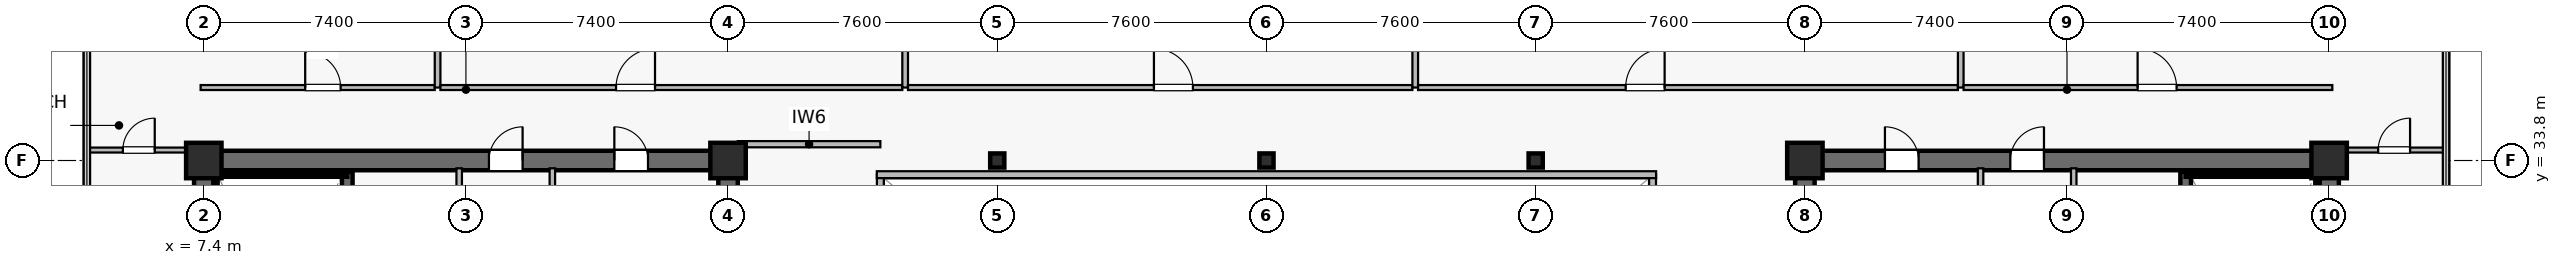
"""IFC4 building model, lengths in metres.
Left out: names, types, materials, properties, quantities, classifications, styles, units other than length and angle.
Written with IfcOpenShell. Run it as: python <this file> out.ifc"""

import sys

from ifc_helpers import new_model, si_unit, direction, frame, frame_2d, origin, origin_2d, place, context, subcontext, project, spatial, rectangle, hollow_rectangle, extrude, source, transform, mapped, element, fill, save


model = new_model("IFC4")
c1 = context("Model", 3, precision=1e-05, world=origin(), true_north=direction((0.0, 1.0)))
c2 = subcontext(c1, "Body", "Model", "MODEL_VIEW")
j1 = project(units=[si_unit("LENGTHUNIT", "METRE"), si_unit("PLANEANGLEUNIT", "RADIAN")], contexts=[c1])
p1 = place(None, origin())
s1 = spatial("IfcSite", under=j1, at=p1, CompositionType="ELEMENT")
p2 = place(p1, origin())
s2 = spatial("IfcBuilding", under=s1, at=p2, CompositionType="ELEMENT")
p3 = place(p2, frame((0.0, 0.0, 213.7)))
s3 = spatial("IfcBuildingStorey", under=s2, at=p3, CompositionType="ELEMENT", Elevation=213.7)
p4 = place(p3, frame((7.125, 33.8, 0.0), z_axis=(0.0, 0.0, 1.0), x_axis=(1.0, 0.0, 0.0)))
e1 = element("IfcWall", 1, at=p4, inside=s3, PredefinedType="SHEAR", context=c2, shape_type="SweptSolid", body=[
    extrude(rectangle(XDim=15.35, YDim=0.55, at=frame_2d((7.675, 0.0))), origin(), (0.0, 0.0, 1.0), 3.8),
])
p5 = place(p4, frame((8.325, 0.0, 0.0)))
e2 = element("IfcOpeningElement", 2, at=p5, cuts=e1, PredefinedType="OPENING", context=c2, shape_type="SweptSolid", body=[
    extrude(rectangle(XDim=0.95, YDim=2.15, at=frame_2d((0.475, 1.075))), frame((0.0, 0.285, 0.0), z_axis=(0.0, -1.0, 0.0), x_axis=(1.0, 0.0, 0.0)), (0.0, 0.0, 1.0), 0.57),
])
p6 = place(p4, frame((11.865, 0.0, 0.0)))
e3 = element("IfcOpeningElement", 3, at=p6, cuts=e1, PredefinedType="OPENING", context=c2, shape_type="SweptSolid", body=[
    extrude(rectangle(XDim=0.95, YDim=2.15, at=frame_2d((0.475, 1.075))), frame((0.0, 0.285, 0.0), z_axis=(0.0, -1.0, 0.0), x_axis=(1.0, 0.0, 0.0)), (0.0, 0.0, 1.0), 0.57),
])
p7 = place(p3, frame((7.4, 15.075, 0.0), z_axis=(0.0, 0.0, 1.0), x_axis=(0.0, 1.0, 0.0)))
e4 = element("IfcWall", 4, at=p7, inside=s3, PredefinedType="SHEAR", context=c2, shape_type="SweptSolid", body=[
    extrude(rectangle(XDim=18.45, YDim=0.55, at=frame_2d((9.225, 0.0))), origin(), (0.0, 0.0, 1.0), 3.8),
])
p8 = place(p3, frame((22.2, 15.075, 0.0), z_axis=(0.0, 0.0, 1.0), x_axis=(0.0, 1.0, 0.0)))
e5 = element("IfcWall", 5, at=p8, inside=s3, PredefinedType="SHEAR", context=c2, shape_type="SweptSolid", body=[
    extrude(rectangle(XDim=18.45, YDim=0.55, at=frame_2d((9.225, 0.0))), origin(), (0.0, 0.0, 1.0), 3.8),
])
p9 = place(p8, frame((3.475, 0.0, 0.0)))
e6 = element("IfcOpeningElement", 6, at=p9, cuts=e5, PredefinedType="OPENING", context=c2, shape_type="SweptSolid", body=[
    extrude(rectangle(XDim=1.42, YDim=2.2, at=frame_2d((0.71, 1.1))), frame((0.0, 0.285, 0.0), z_axis=(0.0, -1.0, 0.0), x_axis=(1.0, 0.0, 0.0)), (0.0, 0.0, 1.0), 0.57),
])
p10 = place(p3, frame((11.45, 24.85, 0.0), z_axis=(0.0, 0.0, 1.0), x_axis=(0.0, 1.0, 0.0)))
e7 = element("IfcWall", 7, at=p10, inside=s3, PredefinedType="SHEAR", context=c2, shape_type="SweptSolid", body=[
    extrude(rectangle(XDim=8.63, YDim=0.3, at=frame_2d((4.315, 0.0))), origin(), (0.0, 0.0, 1.0), 3.8),
])
p11 = place(p10, frame((0.42, 0.0, 0.0)))
e8 = element("IfcOpeningElement", 8, at=p11, cuts=e7, PredefinedType="OPENING", context=c2, shape_type="SweptSolid", body=[
    extrude(rectangle(XDim=1.1, YDim=2.15, at=frame_2d((0.55, 1.075))), frame((0.0, 0.16, 0.0), z_axis=(0.0, -1.0, 0.0), x_axis=(1.0, 0.0, 0.0)), (0.0, 0.0, 1.0), 0.32),
])
p12 = place(p3, frame((7.73, 33.4, 0.0), z_axis=(0.0, 0.0, 1.0), x_axis=(1.0, 0.0, 0.0)))
e9 = element("IfcWall", 9, at=p12, inside=s3, PredefinedType="SOLIDWALL", context=c2, shape_type="SweptSolid", body=[
    extrude(rectangle(XDim=3.72, YDim=0.12, at=frame_2d((1.86, 0.0))), origin(), (0.0, 0.0, 1.0), 3.8),
])
p13 = place(p3, frame((7.73, 25.0, 0.0), z_axis=(0.0, 0.0, 1.0), x_axis=(0.0, 1.0, 0.0)))
e10 = element("IfcWall", 10, at=p13, inside=s3, PredefinedType="SOLIDWALL", context=c2, shape_type="SweptSolid", body=[
    extrude(rectangle(XDim=8.32, YDim=0.12, at=frame_2d((4.16, 0.0))), origin(), (0.0, 0.0, 1.0), 3.8),
])
p14 = place(p3, frame((52.325, 33.8, 0.0), z_axis=(0.0, 0.0, 1.0), x_axis=(1.0, 0.0, 0.0)))
e11 = element("IfcWall", 11, at=p14, inside=s3, PredefinedType="SHEAR", context=c2, shape_type="SweptSolid", body=[
    extrude(rectangle(XDim=15.35, YDim=0.55, at=frame_2d((7.675, 0.0))), origin(), (0.0, 0.0, 1.0), 3.8),
])
p15 = place(p14, frame((6.075, 0.0, 0.0)))
e12 = element("IfcOpeningElement", 12, at=p15, cuts=e11, PredefinedType="OPENING", context=c2, shape_type="SweptSolid", body=[
    extrude(rectangle(XDim=0.95, YDim=2.15, at=frame_2d((0.475, 1.075))), frame((0.0, 0.285, 0.0), z_axis=(0.0, -1.0, 0.0), x_axis=(1.0, 0.0, 0.0)), (0.0, 0.0, 1.0), 0.57),
])
p16 = place(p14, frame((2.535, 0.0, 0.0)))
e13 = element("IfcOpeningElement", 13, at=p16, cuts=e11, PredefinedType="OPENING", context=c2, shape_type="SweptSolid", body=[
    extrude(rectangle(XDim=0.95, YDim=2.15, at=frame_2d((0.475, 1.075))), frame((0.0, 0.285, 0.0), z_axis=(0.0, -1.0, 0.0), x_axis=(1.0, 0.0, 0.0)), (0.0, 0.0, 1.0), 0.57),
])
p17 = place(p3, frame((52.6, 15.075, 0.0), z_axis=(0.0, 0.0, 1.0), x_axis=(0.0, 1.0, 0.0)))
e14 = element("IfcWall", 14, at=p17, inside=s3, PredefinedType="SHEAR", context=c2, shape_type="SweptSolid", body=[
    extrude(rectangle(XDim=18.45, YDim=0.55, at=frame_2d((9.225, 0.0))), origin(), (0.0, 0.0, 1.0), 3.8),
])
p18 = place(p17, frame((3.475, 0.0, 0.0)))
e15 = element("IfcOpeningElement", 15, at=p18, cuts=e14, PredefinedType="OPENING", context=c2, shape_type="SweptSolid", body=[
    extrude(rectangle(XDim=1.42, YDim=2.2, at=frame_2d((0.71, 1.1))), frame((0.0, 0.285, 0.0), z_axis=(0.0, -1.0, 0.0), x_axis=(1.0, 0.0, 0.0)), (0.0, 0.0, 1.0), 0.57),
])
p19 = place(p3, frame((67.4, 15.075, 0.0), z_axis=(0.0, 0.0, 1.0), x_axis=(0.0, 1.0, 0.0)))
e16 = element("IfcWall", 16, at=p19, inside=s3, PredefinedType="SHEAR", context=c2, shape_type="SweptSolid", body=[
    extrude(rectangle(XDim=18.45, YDim=0.55, at=frame_2d((9.225, 0.0))), origin(), (0.0, 0.0, 1.0), 3.8),
])
p20 = place(p3, frame((63.35, 24.85, 0.0), z_axis=(0.0, 0.0, 1.0), x_axis=(0.0, 1.0, 0.0)))
e17 = element("IfcWall", 17, at=p20, inside=s3, PredefinedType="SHEAR", context=c2, shape_type="SweptSolid", body=[
    extrude(rectangle(XDim=8.63, YDim=0.3, at=frame_2d((4.315, 0.0))), origin(), (0.0, 0.0, 1.0), 3.8),
])
p21 = place(p20, frame((0.42, 0.0, 0.0)))
e18 = element("IfcOpeningElement", 18, at=p21, cuts=e17, PredefinedType="OPENING", context=c2, shape_type="SweptSolid", body=[
    extrude(rectangle(XDim=1.1, YDim=2.15, at=frame_2d((0.55, 1.075))), frame((0.0, 0.16, 0.0), z_axis=(0.0, -1.0, 0.0), x_axis=(1.0, 0.0, 0.0)), (0.0, 0.0, 1.0), 0.32),
])
p22 = place(p3, frame((63.35, 33.4, 0.0), z_axis=(0.0, 0.0, 1.0), x_axis=(1.0, 0.0, 0.0)))
e19 = element("IfcWall", 19, at=p22, inside=s3, PredefinedType="SOLIDWALL", context=c2, shape_type="SweptSolid", body=[
    extrude(rectangle(XDim=3.72, YDim=0.12, at=frame_2d((1.86, 0.0))), origin(), (0.0, 0.0, 1.0), 3.8),
])
p23 = place(p3, frame((67.07, 25.0, 0.0), z_axis=(0.0, 0.0, 1.0), x_axis=(0.0, 1.0, 0.0)))
e20 = element("IfcWall", 20, at=p23, inside=s3, PredefinedType="SOLIDWALL", context=c2, shape_type="SweptSolid", body=[
    extrude(rectangle(XDim=8.32, YDim=0.12, at=frame_2d((4.16, 0.0))), origin(), (0.0, 0.0, 1.0), 3.8),
])
m1 = source(origin(), c2, "Body", "SweptSolid", [
    extrude(rectangle(XDim=1.0, YDim=1.0, at=origin_2d()), origin(), (0.0, 0.0, 1.0), 4.1),
])
for number, where, z_axis, x_axis in (
    (21, (7.4, 33.8, 0.0), (0.0, 0.0, 1.0), (1.0, 0.0, 0.0)),
    (22, (22.2, 33.8, 0.0), (0.0, 0.0, 1.0), (1.0, 0.0, 0.0)),
    (23, (52.6, 33.8, 0.0), (0.0, 0.0, 1.0), (1.0, 0.0, 0.0)),
    (24, (67.4, 33.8, 0.0), (0.0, 0.0, 1.0), (1.0, 0.0, 0.0)),
):
    element("IfcColumn", number, at=place(p3, frame(where, z_axis=z_axis, x_axis=x_axis)), inside=s3, PredefinedType="COLUMN", context=c2, shape_type="MappedRepresentation", body=[
        mapped(m1, transform((0.0, 0.0, 0.0), scale=1.0)),
    ])
m2 = source(origin(), c2, "Body", "SweptSolid", [
    extrude(hollow_rectangle(XDim=0.4, YDim=0.4, WallThickness=0.019, at=origin_2d()), origin(), (0.0, 0.0, 1.0), 4.1),
])
for number, where, z_axis, x_axis in (
    (25, (29.8, 33.8, 0.0), (0.0, 0.0, 1.0), (1.0, 0.0, 0.0)),
    (26, (37.4, 33.8, 0.0), (0.0, 0.0, 1.0), (1.0, 0.0, 0.0)),
    (27, (45.0, 33.8, 0.0), (0.0, 0.0, 1.0), (1.0, 0.0, 0.0)),
):
    element("IfcColumn", number, at=place(p3, frame(where, z_axis=z_axis, x_axis=x_axis)), inside=s3, PredefinedType="COLUMN", context=c2, shape_type="MappedRepresentation", body=[
        mapped(m2, transform((0.0, 0.0, 0.0), scale=1.0)),
    ])
p24 = place(p3, frame((14.61, 29.65, 0.0), z_axis=(0.0, 0.0, 1.0), x_axis=(0.0, 1.0, 0.0)))
e28 = element("IfcWall", 28, at=p24, inside=s3, PredefinedType="PLUMBINGWALL", context=c2, shape_type="SweptSolid", body=[
    extrude(rectangle(XDim=3.93, YDim=0.155, at=frame_2d((1.965, 0.0))), origin(), (0.0, 0.0, 1.0), 3.197),
])
p25 = place(p3, frame((17.24, 29.65, 0.0), z_axis=(0.0, 0.0, 1.0), x_axis=(0.0, 1.0, 0.0)))
e29 = element("IfcWall", 29, at=p25, inside=s3, PredefinedType="PLUMBINGWALL", context=c2, shape_type="SweptSolid", body=[
    extrude(rectangle(XDim=3.93, YDim=0.155, at=frame_2d((1.965, 0.0))), origin(), (0.0, 0.0, 1.0), 3.8),
])
p26 = place(p3, frame((60.19, 29.65, 0.0), z_axis=(0.0, 0.0, 1.0), x_axis=(0.0, 1.0, 0.0)))
e30 = element("IfcWall", 30, at=p26, inside=s3, PredefinedType="PLUMBINGWALL", context=c2, shape_type="SweptSolid", body=[
    extrude(rectangle(XDim=3.93, YDim=0.155, at=frame_2d((1.965, 0.0))), origin(), (0.0, 0.0, 1.0), 3.197),
])
p27 = place(p3, frame((57.56, 29.65, 0.0), z_axis=(0.0, 0.0, 1.0), x_axis=(0.0, 1.0, 0.0)))
e31 = element("IfcWall", 31, at=p27, inside=s3, PredefinedType="PLUMBINGWALL", context=c2, shape_type="SweptSolid", body=[
    extrude(rectangle(XDim=3.93, YDim=0.155, at=frame_2d((1.965, 0.0))), origin(), (0.0, 0.0, 1.0), 3.8),
])
p28 = place(p3, frame((22.475, 34.26, 0.0), z_axis=(0.0, 0.0, 1.0), x_axis=(1.0, 0.0, 0.0)))
e32 = element("IfcWall", 32, at=p28, inside=s3, PredefinedType="PARTITIONING", context=c2, shape_type="SweptSolid", body=[
    extrude(rectangle(XDim=4.025, YDim=0.175, at=frame_2d((2.012, 0.0))), origin(), (0.0, 0.0, 1.0), 3.485),
])
p29 = place(p3, frame((26.5, 15.2, 0.0), z_axis=(0.0, 0.0, 1.0), x_axis=(0.0, 1.0, 0.0)))
e33 = element("IfcWall", 33, at=p29, inside=s3, PredefinedType="SOLIDWALL", context=c2, shape_type="SweptSolid", body=[
    extrude(rectangle(XDim=18.2, YDim=0.195, at=frame_2d((9.1, 0.0))), origin(), (0.0, 0.0, 1.0), 3.8),
])
p30 = place(p29, frame((1.8, 0.0, 0.9)))
e34 = element("IfcOpeningElement", 34, at=p30, cuts=e33, PredefinedType="OPENING", context=c2, shape_type="SweptSolid", body=[
    extrude(rectangle(XDim=1.2, YDim=1.35, at=frame_2d((0.6, 0.675))), frame((0.0, 0.107, 0.0), z_axis=(0.0, -1.0, 0.0), x_axis=(1.0, 0.0, 0.0)), (0.0, 0.0, 1.0), 0.215),
])
p31 = place(p29, frame((13.2, 0.0, 0.9)))
e35 = element("IfcOpeningElement", 35, at=p31, cuts=e33, PredefinedType="OPENING", context=c2, shape_type="SweptSolid", body=[
    extrude(rectangle(XDim=1.2, YDim=1.35, at=frame_2d((0.6, 0.675))), frame((0.0, 0.107, 0.0), z_axis=(0.0, -1.0, 0.0), x_axis=(1.0, 0.0, 0.0)), (0.0, 0.0, 1.0), 0.215),
])
p32 = place(p3, frame((48.3, 15.2, 0.0), z_axis=(0.0, 0.0, 1.0), x_axis=(0.0, 1.0, 0.0)))
e36 = element("IfcWall", 36, at=p32, inside=s3, PredefinedType="SOLIDWALL", context=c2, shape_type="SweptSolid", body=[
    extrude(rectangle(XDim=18.2, YDim=0.195, at=frame_2d((9.1, 0.0))), origin(), (0.0, 0.0, 1.0), 3.8),
])
p33 = place(p32, frame((1.8, 0.0, 0.9)))
e37 = element("IfcOpeningElement", 37, at=p33, cuts=e36, PredefinedType="OPENING", context=c2, shape_type="SweptSolid", body=[
    extrude(rectangle(XDim=1.2, YDim=1.35, at=frame_2d((0.6, 0.675))), frame((0.0, 0.107, 0.0), z_axis=(0.0, -1.0, 0.0), x_axis=(1.0, 0.0, 0.0)), (0.0, 0.0, 1.0), 0.215),
])
p34 = place(p32, frame((13.2, 0.0, 0.9)))
e38 = element("IfcOpeningElement", 38, at=p34, cuts=e36, PredefinedType="OPENING", context=c2, shape_type="SweptSolid", body=[
    extrude(rectangle(XDim=1.2, YDim=1.35, at=frame_2d((0.6, 0.675))), frame((0.0, 0.107, 0.0), z_axis=(0.0, -1.0, 0.0), x_axis=(1.0, 0.0, 0.0)), (0.0, 0.0, 1.0), 0.215),
])
p35 = place(p3, frame((26.4, 33.4, 0.0), z_axis=(0.0, 0.0, 1.0), x_axis=(1.0, 0.0, 0.0)))
e39 = element("IfcWall", 39, at=p35, inside=s3, PredefinedType="SOLIDWALL", context=c2, shape_type="SweptSolid", body=[
    extrude(rectangle(XDim=22.0, YDim=0.195, at=frame_2d((11.0, 0.0))), origin(), (0.0, 0.0, 1.0), 3.8),
])
p36 = place(p3, frame((7.31, 35.86, 0.0), z_axis=(0.0, 0.0, 1.0), x_axis=(1.0, 0.0, 0.0)))
e40 = element("IfcWall", 40, at=p36, inside=s3, PredefinedType="PARTITIONING", context=c2, shape_type="SweptSolid", body=[
    extrude(rectangle(XDim=6.61, YDim=0.14, at=frame_2d((3.305, 0.0))), origin(), (0.0, 0.0, 1.0), 3.335),
])
p37 = place(p36, frame((2.952, 0.0, 0.0)))
e41 = element("IfcOpeningElement", 41, at=p37, cuts=e40, PredefinedType="OPENING", context=c2, shape_type="SweptSolid", body=[
    extrude(rectangle(XDim=1.0, YDim=2.15, at=frame_2d((0.5, 1.075))), frame((0.0, 0.08, 0.0), z_axis=(0.0, -1.0, 0.0), x_axis=(1.0, 0.0, 0.0)), (0.0, 0.0, 1.0), 0.16),
])
p38 = place(p3, frame((14.0, 35.86, 0.0), z_axis=(0.0, 0.0, 1.0), x_axis=(0.0, 1.0, 0.0)))
e42 = element("IfcWall", 42, at=p38, inside=s3, PredefinedType="PARTITIONING", context=c2, shape_type="SweptSolid", body=[
    extrude(rectangle(XDim=10.03, YDim=0.16, at=frame_2d((5.015, 0.0))), origin(), (0.0, 0.0, 1.0), 3.135),
])
p39 = place(p3, frame((14.08, 35.86, 0.0), z_axis=(0.0, 0.0, 1.0), x_axis=(1.0, 0.0, 0.0)))
e43 = element("IfcWall", 43, at=p39, inside=s3, PredefinedType="PARTITIONING", context=c2, shape_type="SweptSolid", body=[
    extrude(rectangle(XDim=13.04, YDim=0.14, at=frame_2d((6.52, 0.0))), origin(), (0.0, 0.0, 1.0), 3.197),
])
p40 = place(p39, frame((4.958, 0.0, 0.0)))
e44 = element("IfcOpeningElement", 44, at=p40, cuts=e43, PredefinedType="OPENING", context=c2, shape_type="SweptSolid", body=[
    extrude(rectangle(XDim=1.1, YDim=2.18, at=frame_2d((0.55, 1.09))), frame((0.0, 0.08, 0.0), z_axis=(0.0, -1.0, 0.0), x_axis=(1.0, 0.0, 0.0)), (0.0, 0.0, 1.0), 0.16),
])
p41 = place(p3, frame((27.2, 35.86, 0.0), z_axis=(0.0, 0.0, 1.0), x_axis=(0.0, 1.0, 0.0)))
e45 = element("IfcWall", 45, at=p41, inside=s3, PredefinedType="PARTITIONING", context=c2, shape_type="SweptSolid", body=[
    extrude(rectangle(XDim=8.83, YDim=0.16, at=frame_2d((4.415, 0.0))), origin(), (0.0, 0.0, 1.0), 3.135),
])
p42 = place(p3, frame((27.28, 35.86, 0.0), z_axis=(0.0, 0.0, 1.0), x_axis=(1.0, 0.0, 0.0)))
e46 = element("IfcWall", 46, at=p42, inside=s3, PredefinedType="PARTITIONING", context=c2, shape_type="SweptSolid", body=[
    extrude(rectangle(XDim=14.24, YDim=0.14, at=frame_2d((7.12, 0.0))), origin(), (0.0, 0.0, 1.0), 3.197),
])
p43 = place(p42, frame((6.943, 0.0, 0.0)))
e47 = element("IfcOpeningElement", 47, at=p43, cuts=e46, PredefinedType="OPENING", context=c2, shape_type="SweptSolid", body=[
    extrude(rectangle(XDim=1.1, YDim=2.18, at=frame_2d((0.55, 1.09))), frame((0.0, 0.08, 0.0), z_axis=(0.0, -1.0, 0.0), x_axis=(1.0, 0.0, 0.0)), (0.0, 0.0, 1.0), 0.16),
])
p44 = place(p3, frame((41.6, 35.86, 0.0), z_axis=(0.0, 0.0, 1.0), x_axis=(0.0, 1.0, 0.0)))
e48 = element("IfcWall", 48, at=p44, inside=s3, PredefinedType="PARTITIONING", context=c2, shape_type="SweptSolid", body=[
    extrude(rectangle(XDim=8.83, YDim=0.16, at=frame_2d((4.415, 0.0))), origin(), (0.0, 0.0, 1.0), 3.135),
])
p45 = place(p3, frame((41.68, 35.86, 0.0), z_axis=(0.0, 0.0, 1.0), x_axis=(1.0, 0.0, 0.0)))
e49 = element("IfcWall", 49, at=p45, inside=s3, PredefinedType="PARTITIONING", context=c2, shape_type="SweptSolid", body=[
    extrude(rectangle(XDim=15.24, YDim=0.14, at=frame_2d((7.62, 0.0))), origin(), (0.0, 0.0, 1.0), 3.197),
])
p46 = place(p45, frame((5.86, 0.0, 0.0)))
e50 = element("IfcOpeningElement", 50, at=p46, cuts=e49, PredefinedType="OPENING", context=c2, shape_type="SweptSolid", body=[
    extrude(rectangle(XDim=1.1, YDim=2.18, at=frame_2d((0.55, 1.09))), frame((0.0, 0.08, 0.0), z_axis=(0.0, -1.0, 0.0), x_axis=(1.0, 0.0, 0.0)), (0.0, 0.0, 1.0), 0.16),
])
p47 = place(p3, frame((57.0, 35.86, 0.0), z_axis=(0.0, 0.0, 1.0), x_axis=(0.0, 1.0, 0.0)))
e51 = element("IfcWall", 51, at=p47, inside=s3, PredefinedType="PARTITIONING", context=c2, shape_type="SweptSolid", body=[
    extrude(rectangle(XDim=10.03, YDim=0.16, at=frame_2d((5.015, 0.0))), origin(), (0.0, 0.0, 1.0), 3.135),
])
p48 = place(p3, frame((57.08, 35.86, 0.0), z_axis=(0.0, 0.0, 1.0), x_axis=(1.0, 0.0, 0.0)))
e52 = element("IfcWall", 52, at=p48, inside=s3, PredefinedType="PARTITIONING", context=c2, shape_type="SweptSolid", body=[
    extrude(rectangle(XDim=10.41, YDim=0.14, at=frame_2d((5.205, 0.0))), origin(), (0.0, 0.0, 1.0), 3.197),
])
p49 = place(p48, frame((4.913, 0.0, 0.0)))
e53 = element("IfcOpeningElement", 53, at=p49, cuts=e52, PredefinedType="OPENING", context=c2, shape_type="SweptSolid", body=[
    extrude(rectangle(XDim=1.1, YDim=2.18, at=frame_2d((0.55, 1.09))), frame((0.0, 0.08, 0.0), z_axis=(0.0, -1.0, 0.0), x_axis=(1.0, 0.0, 0.0)), (0.0, 0.0, 1.0), 0.16),
])
p50 = place(p3, frame((4.11, 34.095, 0.0), z_axis=(0.0, 0.0, 1.0), x_axis=(1.0, 0.0, 0.0)))
e54 = element("IfcWall", 54, at=p50, inside=s3, PredefinedType="PARTITIONING", context=c2, shape_type="SweptSolid", body=[
    extrude(rectangle(XDim=2.91, YDim=0.14, at=frame_2d((1.455, 0.0))), origin(), (0.0, 0.0, 1.0), 3.8),
])
p51 = place(p50, frame((1.005, 0.0, 0.0)))
e55 = element("IfcOpeningElement", 55, at=p51, cuts=e54, PredefinedType="OPENING", context=c2, shape_type="SweptSolid", body=[
    extrude(rectangle(XDim=0.9, YDim=2.1, at=frame_2d((0.45, 1.05))), frame((0.0, 0.08, 0.0), z_axis=(0.0, -1.0, 0.0), x_axis=(1.0, 0.0, 0.0)), (0.0, 0.0, 1.0), 0.16),
])
p52 = place(p3, frame((67.78, 34.095, 0.0), z_axis=(0.0, 0.0, 1.0), x_axis=(1.0, 0.0, 0.0)))
e56 = element("IfcWall", 56, at=p52, inside=s3, PredefinedType="PARTITIONING", context=c2, shape_type="SweptSolid", body=[
    extrude(rectangle(XDim=2.91, YDim=0.14, at=frame_2d((1.455, 0.0))), origin(), (0.0, 0.0, 1.0), 3.8),
])
p53 = place(p52, frame((1.005, 0.0, 0.0)))
e57 = element("IfcOpeningElement", 57, at=p53, cuts=e56, PredefinedType="OPENING", context=c2, shape_type="SweptSolid", body=[
    extrude(rectangle(XDim=0.9, YDim=2.1, at=frame_2d((0.45, 1.05))), frame((0.0, 0.08, 0.0), z_axis=(0.0, -1.0, 0.0), x_axis=(1.0, 0.0, 0.0)), (0.0, 0.0, 1.0), 0.16),
])
m3 = source(origin(), c2, "Body", "SweptSolid", [
    extrude(rectangle(XDim=0.95, YDim=2.15, at=frame_2d((0.475, 1.075))), frame((0.0, 0.025, 0.0), z_axis=(0.0, -1.0, 0.0), x_axis=(1.0, 0.0, 0.0)), (0.0, 0.0, 1.0), 0.05),
])
p54 = place(p5, origin())
e58 = element("IfcDoor", 58, at=p54, inside=s3, OperationType="SINGLE_SWING_RIGHT", PredefinedType="DOOR", context=c2, shape_type="MappedRepresentation", body=[
    mapped(m3, transform((0.0, 0.0, 0.0), scale=1.0)),
])
fill(e2, e58)
p55 = place(p6, origin())
e59 = element("IfcDoor", 59, at=p55, inside=s3, OperationType="SINGLE_SWING_LEFT", PredefinedType="DOOR", context=c2, shape_type="MappedRepresentation", body=[
    mapped(m3, transform((0.0, 0.0, 0.0), scale=1.0)),
])
fill(e3, e59)
p56 = place(p15, origin())
e60 = element("IfcDoor", 60, at=p56, inside=s3, OperationType="SINGLE_SWING_RIGHT", PredefinedType="DOOR", context=c2, shape_type="MappedRepresentation", body=[
    mapped(m3, transform((0.0, 0.0, 0.0), scale=1.0)),
])
fill(e12, e60)
p57 = place(p16, origin())
e61 = element("IfcDoor", 61, at=p57, inside=s3, OperationType="SINGLE_SWING_LEFT", PredefinedType="DOOR", context=c2, shape_type="MappedRepresentation", body=[
    mapped(m3, transform((0.0, 0.0, 0.0), scale=1.0)),
])
fill(e13, e61)
m4 = source(origin(), c2, "Body", "SweptSolid", [
    extrude(rectangle(XDim=1.0, YDim=2.15, at=frame_2d((0.5, 1.075))), frame((0.0, 0.025, 0.0), z_axis=(0.0, -1.0, 0.0), x_axis=(1.0, 0.0, 0.0)), (0.0, 0.0, 1.0), 0.05),
])
p58 = place(p37, origin())
e62 = element("IfcDoor", 62, at=p58, inside=s3, OperationType="SINGLE_SWING_LEFT", PredefinedType="DOOR", context=c2, shape_type="MappedRepresentation", body=[
    mapped(m4, transform((0.0, 0.0, 0.0), scale=1.0)),
])
fill(e41, e62)
m5 = source(origin(), c2, "Body", "SweptSolid", [
    extrude(rectangle(XDim=1.1, YDim=2.18, at=frame_2d((0.55, 1.09))), frame((0.0, 0.025, 0.0), z_axis=(0.0, -1.0, 0.0), x_axis=(1.0, 0.0, 0.0)), (0.0, 0.0, 1.0), 0.05),
])
p59 = place(p40, origin())
e63 = element("IfcDoor", 63, at=p59, inside=s3, OperationType="SINGLE_SWING_RIGHT", PredefinedType="DOOR", context=c2, shape_type="MappedRepresentation", body=[
    mapped(m5, transform((0.0, 0.0, 0.0), scale=1.0)),
])
fill(e44, e63)
p60 = place(p43, origin())
e64 = element("IfcDoor", 64, at=p60, inside=s3, OperationType="SINGLE_SWING_LEFT", PredefinedType="DOOR", context=c2, shape_type="MappedRepresentation", body=[
    mapped(m5, transform((0.0, 0.0, 0.0), scale=1.0)),
])
fill(e47, e64)
p61 = place(p46, origin())
e65 = element("IfcDoor", 65, at=p61, inside=s3, OperationType="SINGLE_SWING_RIGHT", PredefinedType="DOOR", context=c2, shape_type="MappedRepresentation", body=[
    mapped(m5, transform((0.0, 0.0, 0.0), scale=1.0)),
])
fill(e50, e65)
p62 = place(p49, origin())
e66 = element("IfcDoor", 66, at=p62, inside=s3, OperationType="SINGLE_SWING_LEFT", PredefinedType="DOOR", context=c2, shape_type="MappedRepresentation", body=[
    mapped(m5, transform((0.0, 0.0, 0.0), scale=1.0)),
])
fill(e53, e66)
m6 = source(origin(), c2, "Body", "SweptSolid", [
    extrude(rectangle(XDim=0.9, YDim=2.1, at=frame_2d((0.45, 1.05))), frame((0.0, 0.025, 0.0), z_axis=(0.0, -1.0, 0.0), x_axis=(1.0, 0.0, 0.0)), (0.0, 0.0, 1.0), 0.05),
])
p63 = place(p51, origin())
e67 = element("IfcDoor", 67, at=p63, inside=s3, OperationType="SINGLE_SWING_RIGHT", PredefinedType="DOOR", context=c2, shape_type="MappedRepresentation", body=[
    mapped(m6, transform((0.0, 0.0, 0.0), scale=1.0)),
])
fill(e55, e67)
p64 = place(p53, origin())
e68 = element("IfcDoor", 68, at=p64, inside=s3, OperationType="SINGLE_SWING_RIGHT", PredefinedType="DOOR", context=c2, shape_type="MappedRepresentation", body=[
    mapped(m6, transform((0.0, 0.0, 0.0), scale=1.0)),
])
fill(e57, e68)
save(model, sys.argv[1])
